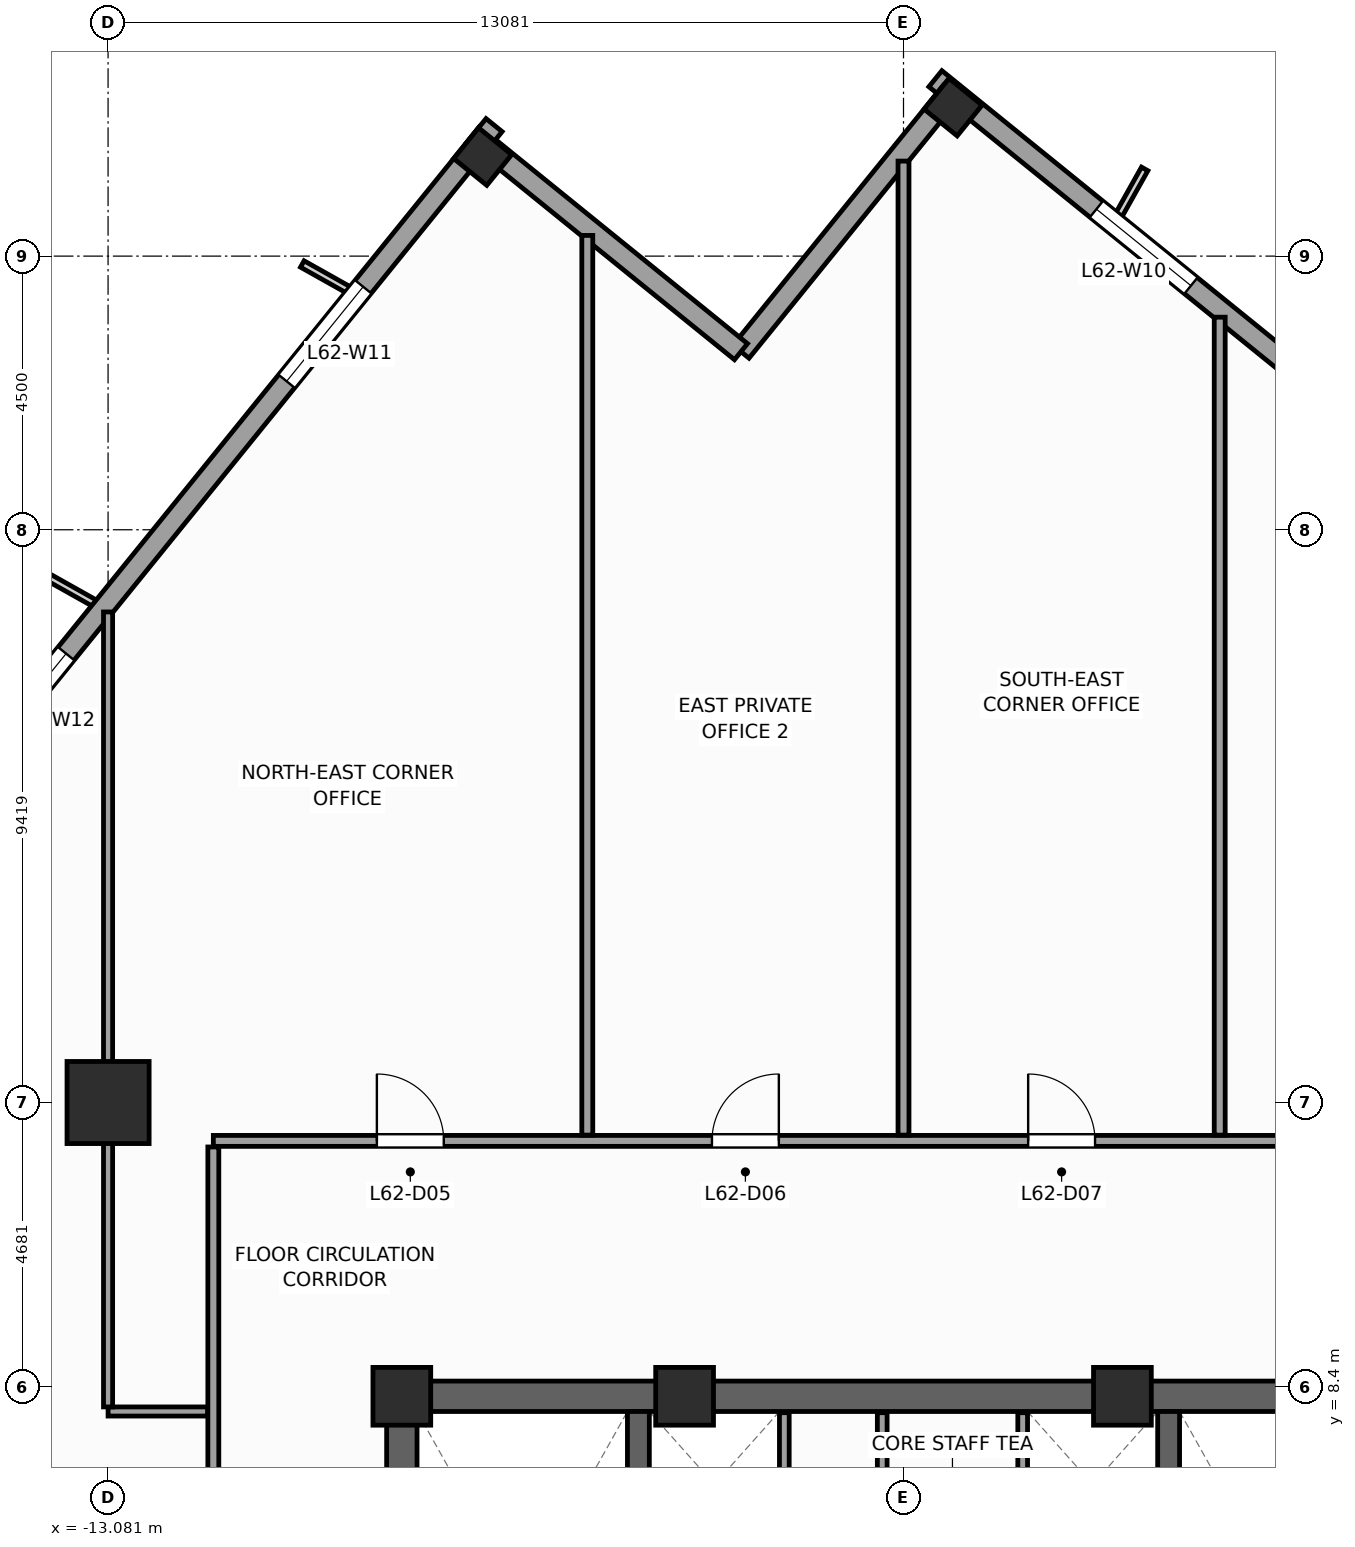
"""IFC4 building model, lengths in metres.
Left out: names, types, materials, properties, quantities, classifications, styles, units other than length and angle.
Written with IfcOpenShell. Run it as: python <this file> out.ifc"""

import sys

from ifc_helpers import new_model, si_unit, direction, frame, frame_2d, origin, origin_2d, place, context, subcontext, project, spatial, rectangle, extrude, source, transform, mapped, element, fill, save


model = new_model("IFC4")
c1 = context("Model", 3, precision=1e-05, world=origin(), true_north=direction((0.0, 1.0)))
c2 = subcontext(c1, "Body", "Model", "MODEL_VIEW")
j1 = project(units=[si_unit("LENGTHUNIT", "METRE"), si_unit("PLANEANGLEUNIT", "RADIAN")], contexts=[c1])
p1 = place(None, origin())
s1 = spatial("IfcSite", under=j1, at=p1, CompositionType="ELEMENT")
p2 = place(p1, origin())
s2 = spatial("IfcBuilding", under=s1, at=p2, CompositionType="ELEMENT")
p3 = place(p2, frame((0.0, 0.0, 256.3)))
s3 = spatial("IfcBuildingStorey", under=s2, at=p3, CompositionType="ELEMENT", Elevation=256.3)
p4 = place(p3, frame((-8.5, 8.25, 0.0), z_axis=(0.0, 0.0, 1.0), x_axis=(1.0, 0.0, 0.0)))
e1 = element("IfcWall", 1, at=p4, inside=s3, PredefinedType="SHEAR", context=c2, shape_type="SweptSolid", body=[
    extrude(rectangle(XDim=17.0, YDim=0.5, at=frame_2d((8.5, 0.0))), origin(), (0.0, 0.0, 1.0), 3.9),
])
p5 = place(p3, frame((-8.25, -8.0, 0.0), z_axis=(0.0, 0.0, 1.0), x_axis=(0.0, 1.0, 0.0)))
e2 = element("IfcWall", 2, at=p5, inside=s3, PredefinedType="SHEAR", context=c2, shape_type="SweptSolid", body=[
    extrude(rectangle(XDim=16.0, YDim=0.5, at=frame_2d((8.0, 0.0))), origin(), (0.0, 0.0, 1.0), 3.9),
])
p6 = place(p5, frame((4.69, 0.0, 0.0)))
e3 = element("IfcOpeningElement", 3, at=p6, cuts=e2, PredefinedType="OPENING", context=c2, shape_type="SweptSolid", body=[
    extrude(rectangle(XDim=1.3, YDim=2.2, at=frame_2d((0.65, 1.1))), frame((0.0, 0.26, 0.0), z_axis=(0.0, -1.0, 0.0), x_axis=(1.0, 0.0, 0.0)), (0.0, 0.0, 1.0), 0.52),
])
for number, where, z_axis, x_axis in (
    (4, (-4.36, -8.0, 0.0), (0.0, 0.0, 1.0), (0.0, 1.0, 0.0)),
    (5, (4.36, -8.0, 0.0), (0.0, 0.0, 1.0), (0.0, 1.0, 0.0)),
):
    element("IfcWall", number, at=place(p3, frame(where, z_axis=z_axis, x_axis=x_axis)), inside=s3, PredefinedType="SHEAR", context=c2, shape_type="SweptSolid", body=[
        extrude(rectangle(XDim=16.0, YDim=0.36, at=frame_2d((8.0, 0.0))), origin(), (0.0, 0.0, 1.0), 3.9),
    ])
m1 = source(origin(), c2, "Body", "SweptSolid", [
    extrude(rectangle(XDim=0.95, YDim=0.95, at=origin_2d()), origin(), (0.0, 0.0, 1.0), 3.9),
])
for number, where, z_axis, x_axis in (
    (6, (-8.25, 8.25, 0.0), (0.0, 0.0, 1.0), (1.0, 0.0, 0.0)),
    (7, (-3.6, 8.25, 0.0), (0.0, 0.0, 1.0), (1.0, 0.0, 0.0)),
    (8, (3.6, 8.25, 0.0), (0.0, 0.0, 1.0), (1.0, 0.0, 0.0)),
):
    element("IfcColumn", number, at=place(p3, frame(where, z_axis=z_axis, x_axis=x_axis)), inside=s3, PredefinedType="PILASTER", context=c2, shape_type="MappedRepresentation", body=[
        mapped(m1, transform((0.0, 0.0, 0.0), scale=1.0)),
    ])
m2 = source(origin(), c2, "Body", "SweptSolid", [
    extrude(rectangle(XDim=1.35, YDim=1.35, at=origin_2d()), origin(), (0.0, 0.0, 1.0), 3.9),
])
p7 = place(p3, frame((-13.081, 13.081, 0.0), z_axis=(0.0, 0.0, 1.0), x_axis=(1.0, 0.0, 0.0)))
e9 = element("IfcColumn", 9, at=p7, inside=s3, PredefinedType="COLUMN", context=c2, shape_type="MappedRepresentation", body=[
    mapped(m2, transform((0.0, 0.0, 0.0), scale=1.0)),
])
m3 = source(origin(), c2, "Body", "SweptSolid", [
    extrude(rectangle(XDim=0.65, YDim=0.7, at=origin_2d()), origin(), (0.0, 0.0, 1.0), 3.9),
])
for number, where, z_axis, x_axis in (
    (10, (0.815, 29.45, 0.0), (0.0, 0.0, 1.0), (0.629, 0.777, 0.0)),
    (11, (-6.92, 28.637, 0.0), (0.0, 0.0, 1.0), (0.629, 0.777, 0.0)),
):
    element("IfcColumn", number, at=place(p3, frame(where, z_axis=z_axis, x_axis=x_axis)), inside=s3, PredefinedType="COLUMN", context=c2, shape_type="MappedRepresentation", body=[
        mapped(m3, transform((0.0, 0.0, 0.0), scale=1.0)),
    ])
p8 = place(p3, frame((29.154, 6.733, 0.0), z_axis=(0.0, 0.0, 1.0), x_axis=(-0.77714192302, 0.629325378072, 0.0)))
e12 = element("IfcWall", 12, at=p8, inside=s3, PredefinedType="STANDARD", context=c2, shape_type="SweptSolid", body=[
    extrude(rectangle(XDim=36.84, YDim=0.34, at=frame_2d((18.42, 0.0))), origin(), (0.0, 0.0, 1.0), 2.02),
])
p9 = place(p8, frame((3.421, 0.0, 0.49)))
e13 = element("IfcOpeningElement", 13, at=p9, cuts=e12, PredefinedType="OPENING", context=c2, shape_type="SweptSolid", body=[
    extrude(rectangle(XDim=2.0, YDim=1.45, at=frame_2d((1.0, 0.725))), frame((0.0, 0.18, 0.0), z_axis=(0.0, -1.0, 0.0), x_axis=(1.0, 0.0, 0.0)), (0.0, 0.0, 1.0), 0.36),
])
p10 = place(p8, frame((9.684, 0.0, 0.49)))
e14 = element("IfcOpeningElement", 14, at=p10, cuts=e12, PredefinedType="OPENING", context=c2, shape_type="SweptSolid", body=[
    extrude(rectangle(XDim=2.0, YDim=1.45, at=frame_2d((1.0, 0.725))), frame((0.0, 0.18, 0.0), z_axis=(0.0, -1.0, 0.0), x_axis=(1.0, 0.0, 0.0)), (0.0, 0.0, 1.0), 0.36),
])
p11 = place(p8, frame((15.183, 0.0, 0.49)))
e15 = element("IfcOpeningElement", 15, at=p11, cuts=e12, PredefinedType="OPENING", context=c2, shape_type="SweptSolid", body=[
    extrude(rectangle(XDim=2.0, YDim=1.45, at=frame_2d((1.0, 0.725))), frame((0.0, 0.18, 0.0), z_axis=(0.0, -1.0, 0.0), x_axis=(1.0, 0.0, 0.0)), (0.0, 0.0, 1.0), 0.36),
])
p12 = place(p8, frame((24.051, 0.0, 0.49)))
e16 = element("IfcOpeningElement", 16, at=p12, cuts=e12, PredefinedType="OPENING", context=c2, shape_type="SweptSolid", body=[
    extrude(rectangle(XDim=2.0, YDim=1.45, at=frame_2d((1.0, 0.725))), frame((0.0, 0.18, 0.0), z_axis=(0.0, -1.0, 0.0), x_axis=(1.0, 0.0, 0.0)), (0.0, 0.0, 1.0), 0.36),
])
p13 = place(p8, frame((31.432, 0.0, 0.49)))
e17 = element("IfcOpeningElement", 17, at=p13, cuts=e12, PredefinedType="OPENING", context=c2, shape_type="SweptSolid", body=[
    extrude(rectangle(XDim=2.0, YDim=1.45, at=frame_2d((1.0, 0.725))), frame((0.0, 0.18, 0.0), z_axis=(0.0, -1.0, 0.0), x_axis=(1.0, 0.0, 0.0)), (0.0, 0.0, 1.0), 0.36),
])
p14 = place(p3, frame((0.789, 29.703, 0.0), z_axis=(0.0, 0.0, 1.0), x_axis=(-0.629323365087, -0.77714355312, 0.0)))
e18 = element("IfcWall", 18, at=p14, inside=s3, PredefinedType="STANDARD", context=c2, shape_type="SweptSolid", body=[
    extrude(rectangle(XDim=5.5, YDim=0.34, at=frame_2d((2.75, 0.0))), origin(), (0.0, 0.0, 1.0), 3.5),
])
p15 = place(p3, frame((-2.673, 25.429, 0.0), z_axis=(0.0, 0.0, 1.0), x_axis=(-0.777162640055, 0.629299794138, 0.0)))
e19 = element("IfcWall", 19, at=p15, inside=s3, PredefinedType="STANDARD", context=c2, shape_type="SweptSolid", body=[
    extrude(rectangle(XDim=5.67, YDim=0.34, at=frame_2d((2.835, 0.0))), origin(), (0.0, 0.0, 1.0), 2.02),
])
p16 = place(p3, frame((-6.733, 29.154, 0.0), z_axis=(0.0, 0.0, 1.0), x_axis=(-0.629325378072, -0.77714192302, 0.0)))
e20 = element("IfcWall", 20, at=p16, inside=s3, PredefinedType="STANDARD", context=c2, shape_type="SweptSolid", body=[
    extrude(rectangle(XDim=36.84, YDim=0.34, at=frame_2d((18.42, 0.0))), origin(), (0.0, 0.0, 1.0), 2.02),
])
p17 = place(p16, frame((23.495, 0.0, 0.0)))
e21 = element("IfcOpeningElement", 21, at=p17, cuts=e20, PredefinedType="OPENING", context=c2, shape_type="SweptSolid", body=[
    extrude(rectangle(XDim=1.05, YDim=2.02, at=frame_2d((0.525, 1.01))), frame((0.0, 0.18, 0.0), z_axis=(0.0, -1.0, 0.0), x_axis=(1.0, 0.0, 0.0)), (0.0, 0.0, 1.0), 0.36),
])
p18 = place(p16, frame((3.421, 0.0, 0.49)))
e22 = element("IfcOpeningElement", 22, at=p18, cuts=e20, PredefinedType="OPENING", context=c2, shape_type="SweptSolid", body=[
    extrude(rectangle(XDim=2.0, YDim=1.45, at=frame_2d((1.0, 0.725))), frame((0.0, 0.18, 0.0), z_axis=(0.0, -1.0, 0.0), x_axis=(1.0, 0.0, 0.0)), (0.0, 0.0, 1.0), 0.36),
])
p19 = place(p16, frame((11.184, 0.0, 0.49)))
e23 = element("IfcOpeningElement", 23, at=p19, cuts=e20, PredefinedType="OPENING", context=c2, shape_type="SweptSolid", body=[
    extrude(rectangle(XDim=2.0, YDim=1.45, at=frame_2d((1.0, 0.725))), frame((0.0, 0.18, 0.0), z_axis=(0.0, -1.0, 0.0), x_axis=(1.0, 0.0, 0.0)), (0.0, 0.0, 1.0), 0.36),
])
p20 = place(p16, frame((15.183, 0.0, 0.49)))
e24 = element("IfcOpeningElement", 24, at=p20, cuts=e20, PredefinedType="OPENING", context=c2, shape_type="SweptSolid", body=[
    extrude(rectangle(XDim=2.0, YDim=1.45, at=frame_2d((1.0, 0.725))), frame((0.0, 0.18, 0.0), z_axis=(0.0, -1.0, 0.0), x_axis=(1.0, 0.0, 0.0)), (0.0, 0.0, 1.0), 0.36),
])
p21 = place(p16, frame((26.301, 0.0, 0.49)))
e25 = element("IfcOpeningElement", 25, at=p21, cuts=e20, PredefinedType="OPENING", context=c2, shape_type="SweptSolid", body=[
    extrude(rectangle(XDim=2.0, YDim=1.45, at=frame_2d((1.0, 0.725))), frame((0.0, 0.18, 0.0), z_axis=(0.0, -1.0, 0.0), x_axis=(1.0, 0.0, 0.0)), (0.0, 0.0, 1.0), 0.36),
])
p22 = place(p16, frame((29.182, 0.0, 0.49)))
e26 = element("IfcOpeningElement", 26, at=p22, cuts=e20, PredefinedType="OPENING", context=c2, shape_type="SweptSolid", body=[
    extrude(rectangle(XDim=2.0, YDim=1.45, at=frame_2d((1.0, 0.725))), frame((0.0, 0.18, 0.0), z_axis=(0.0, -1.0, 0.0), x_axis=(1.0, 0.0, 0.0)), (0.0, 0.0, 1.0), 0.36),
])
for number, where, z_axis, x_axis in (
    (27, (-1.96, 4.58, 0.0), (0.0, 0.0, 1.0), (0.0, 1.0, 0.0)),
    (28, (1.96, 4.58, 0.0), (0.0, 0.0, 1.0), (0.0, 1.0, 0.0)),
):
    element("IfcWall", number, at=place(p3, frame(where, z_axis=z_axis, x_axis=x_axis)), inside=s3, PredefinedType="PARTITIONING", context=c2, shape_type="SweptSolid", body=[
        extrude(rectangle(XDim=3.4, YDim=0.16, at=frame_2d((1.7, 0.0))), origin(), (0.0, 0.0, 1.0), 3.5),
    ])
p23 = place(p3, frame((-0.35, 4.6, 0.0), z_axis=(0.0, 0.0, 1.0), x_axis=(0.0, 1.0, 0.0)))
e29 = element("IfcWall", 29, at=p23, inside=s3, PredefinedType="PARTITIONING", context=c2, shape_type="SweptSolid", body=[
    extrude(rectangle(XDim=3.38, YDim=0.16, at=frame_2d((1.69, 0.0))), origin(), (0.0, 0.0, 1.0), 3.5),
])
p24 = place(p3, frame((-11.35, 12.45, 0.0), z_axis=(0.0, 0.0, 1.0), x_axis=(1.0, 0.0, 0.0)))
e30 = element("IfcWall", 30, at=p24, inside=s3, PredefinedType="PARTITIONING", context=c2, shape_type="SweptSolid", body=[
    extrude(rectangle(XDim=21.65, YDim=0.18, at=frame_2d((10.825, 0.0))), origin(), (0.0, 0.0, 1.0), 2.46),
])
p25 = place(p24, frame((2.689, 0.0, 0.0)))
e31 = element("IfcOpeningElement", 31, at=p25, cuts=e30, PredefinedType="OPENING", context=c2, shape_type="SweptSolid", body=[
    extrude(rectangle(XDim=1.1, YDim=2.2, at=frame_2d((0.55, 1.1))), frame((0.0, 0.1, 0.0), z_axis=(0.0, -1.0, 0.0), x_axis=(1.0, 0.0, 0.0)), (0.0, 0.0, 1.0), 0.2),
])
p26 = place(p24, frame((8.2, 0.0, 0.0)))
e32 = element("IfcOpeningElement", 32, at=p26, cuts=e30, PredefinedType="OPENING", context=c2, shape_type="SweptSolid", body=[
    extrude(rectangle(XDim=1.1, YDim=2.2, at=frame_2d((0.55, 1.1))), frame((0.0, 0.1, 0.0), z_axis=(0.0, -1.0, 0.0), x_axis=(1.0, 0.0, 0.0)), (0.0, 0.0, 1.0), 0.2),
])
p27 = place(p24, frame((13.4, 0.0, 0.0)))
e33 = element("IfcOpeningElement", 33, at=p27, cuts=e30, PredefinedType="OPENING", context=c2, shape_type="SweptSolid", body=[
    extrude(rectangle(XDim=1.1, YDim=2.2, at=frame_2d((0.55, 1.1))), frame((0.0, 0.1, 0.0), z_axis=(0.0, -1.0, 0.0), x_axis=(1.0, 0.0, 0.0)), (0.0, 0.0, 1.0), 0.2),
])
p28 = place(p24, frame((18.385, 0.0, 0.0)))
e34 = element("IfcOpeningElement", 34, at=p28, cuts=e30, PredefinedType="OPENING", context=c2, shape_type="SweptSolid", body=[
    extrude(rectangle(XDim=1.1, YDim=2.2, at=frame_2d((0.55, 1.1))), frame((0.0, 0.1, 0.0), z_axis=(0.0, -1.0, 0.0), x_axis=(1.0, 0.0, 0.0)), (0.0, 0.0, 1.0), 0.2),
])
p29 = place(p3, frame((-11.35, -11.3, 0.0), z_axis=(0.0, 0.0, 1.0), x_axis=(0.0, 1.0, 0.0)))
e35 = element("IfcWall", 35, at=p29, inside=s3, PredefinedType="PARTITIONING", context=c2, shape_type="SweptSolid", body=[
    extrude(rectangle(XDim=23.65, YDim=0.18, at=frame_2d((11.825, 0.0))), origin(), (0.0, 0.0, 1.0), 3.5),
])
p30 = place(p29, frame((13.1, 0.0, 0.0)))
e36 = element("IfcOpeningElement", 36, at=p30, cuts=e35, PredefinedType="OPENING", context=c2, shape_type="SweptSolid", body=[
    extrude(rectangle(XDim=1.1, YDim=2.2, at=frame_2d((0.55, 1.1))), frame((0.0, 0.1, 0.0), z_axis=(0.0, -1.0, 0.0), x_axis=(1.0, 0.0, 0.0)), (0.0, 0.0, 1.0), 0.2),
])
p31 = place(p29, frame((16.85, 0.0, 0.0)))
e37 = element("IfcOpeningElement", 37, at=p31, cuts=e35, PredefinedType="OPENING", context=c2, shape_type="SweptSolid", body=[
    extrude(rectangle(XDim=1.1, YDim=2.2, at=frame_2d((0.55, 1.1))), frame((0.0, 0.1, 0.0), z_axis=(0.0, -1.0, 0.0), x_axis=(1.0, 0.0, 0.0)), (0.0, 0.0, 1.0), 0.2),
])
p32 = place(p29, frame((5.0, 0.0, 0.0)))
e38 = element("IfcOpeningElement", 38, at=p32, cuts=e35, PredefinedType="OPENING", context=c2, shape_type="SweptSolid", body=[
    extrude(rectangle(XDim=1.1, YDim=2.2, at=frame_2d((0.55, 1.1))), frame((0.0, 0.1, 0.0), z_axis=(0.0, -1.0, 0.0), x_axis=(1.0, 0.0, 0.0)), (0.0, 0.0, 1.0), 0.2),
])
p33 = place(p29, frame((9.25, 0.0, 0.0)))
e39 = element("IfcOpeningElement", 39, at=p33, cuts=e35, PredefinedType="OPENING", context=c2, shape_type="SweptSolid", body=[
    extrude(rectangle(XDim=1.1, YDim=2.2, at=frame_2d((0.55, 1.1))), frame((0.0, 0.1, 0.0), z_axis=(0.0, -1.0, 0.0), x_axis=(1.0, 0.0, 0.0)), (0.0, 0.0, 1.0), 0.2),
])
p34 = place(p3, frame((-5.2, 12.545, 0.0), z_axis=(0.0, 0.0, 1.0), x_axis=(0.0, 1.0, 0.0)))
e40 = element("IfcWall", 40, at=p34, inside=s3, PredefinedType="PARTITIONING", context=c2, shape_type="SweptSolid", body=[
    extrude(rectangle(XDim=14.795, YDim=0.18, at=frame_2d((7.398, 0.0))), origin(), (0.0, 0.0, 1.0), 3.5),
])
p35 = place(p3, frame((0.0, 12.545, 0.0), z_axis=(0.0, 0.0, 1.0), x_axis=(0.0, 1.0, 0.0)))
e41 = element("IfcWall", 41, at=p35, inside=s3, PredefinedType="PARTITIONING", context=c2, shape_type="SweptSolid", body=[
    extrude(rectangle(XDim=16.018, YDim=0.18, at=frame_2d((8.009, 0.0))), origin(), (0.0, 0.0, 1.0), 3.5),
])
p36 = place(p3, frame((5.2, 12.545, 0.0), z_axis=(0.0, 0.0, 1.0), x_axis=(0.0, 1.0, 0.0)))
e42 = element("IfcWall", 42, at=p36, inside=s3, PredefinedType="PARTITIONING", context=c2, shape_type="SweptSolid", body=[
    extrude(rectangle(XDim=13.451, YDim=0.18, at=frame_2d((6.726, 0.0))), origin(), (0.0, 0.0, 1.0), 3.5),
])
p37 = place(p3, frame((-11.445, 8.0, 0.0), z_axis=(0.0, 0.0, 1.0), x_axis=(-1.0, 0.0, 0.0)))
e43 = element("IfcWall", 43, at=p37, inside=s3, PredefinedType="PARTITIONING", context=c2, shape_type="SweptSolid", body=[
    extrude(rectangle(XDim=1.636, YDim=0.15, at=frame_2d((0.818, 0.0))), origin(), (0.0, 0.0, 1.0), 3.5),
])
p38 = place(p3, frame((-13.081, 8.075, 0.0), z_axis=(0.0, 0.0, 1.0), x_axis=(0.0, 1.0, 0.0)))
e44 = element("IfcWall", 44, at=p38, inside=s3, PredefinedType="PARTITIONING", context=c2, shape_type="SweptSolid", body=[
    extrude(rectangle(XDim=13.073, YDim=0.15, at=frame_2d((6.537, 0.0))), origin(), (0.0, 0.0, 1.0), 2.02),
])
m4 = source(origin(), c2, "Body", "SweptSolid", [
    extrude(rectangle(XDim=2.0, YDim=1.45, at=frame_2d((1.0, 0.725))), frame((0.0, 0.03, 0.0), z_axis=(0.0, -1.0, 0.0), x_axis=(1.0, 0.0, 0.0)), (0.0, 0.0, 1.0), 0.06),
])
p39 = place(p13, origin())
e45 = element("IfcWindow", 45, at=p39, inside=s3, PartitioningType="SINGLE_PANEL", PredefinedType="WINDOW", context=c2, shape_type="MappedRepresentation", body=[
    mapped(m4, transform((0.0, 0.0, 0.0), scale=1.0)),
])
fill(e17, e45)
p40 = place(p18, origin())
e46 = element("IfcWindow", 46, at=p40, inside=s3, PartitioningType="SINGLE_PANEL", PredefinedType="WINDOW", context=c2, shape_type="MappedRepresentation", body=[
    mapped(m4, transform((0.0, 0.0, 0.0), scale=1.0)),
])
fill(e22, e46)
p41 = place(p19, origin())
e47 = element("IfcWindow", 47, at=p41, inside=s3, PartitioningType="SINGLE_PANEL", PredefinedType="WINDOW", context=c2, shape_type="MappedRepresentation", body=[
    mapped(m4, transform((0.0, 0.0, 0.0), scale=1.0)),
])
fill(e23, e47)
m5 = source(origin(), c2, "Body", "SweptSolid", [
    extrude(rectangle(XDim=1.1, YDim=2.2, at=frame_2d((0.55, 1.1))), frame((0.0, 0.025, 0.0), z_axis=(0.0, -1.0, 0.0), x_axis=(1.0, 0.0, 0.0)), (0.0, 0.0, 1.0), 0.05),
])
p42 = place(p25, origin())
e48 = element("IfcDoor", 48, at=p42, inside=s3, OperationType="SINGLE_SWING_LEFT", PredefinedType="DOOR", context=c2, shape_type="MappedRepresentation", body=[
    mapped(m5, transform((0.0, 0.0, 0.0), scale=1.0)),
])
fill(e31, e48)
p43 = place(p26, origin())
e49 = element("IfcDoor", 49, at=p43, inside=s3, OperationType="SINGLE_SWING_RIGHT", PredefinedType="DOOR", context=c2, shape_type="MappedRepresentation", body=[
    mapped(m5, transform((0.0, 0.0, 0.0), scale=1.0)),
])
fill(e32, e49)
p44 = place(p27, origin())
e50 = element("IfcDoor", 50, at=p44, inside=s3, OperationType="SINGLE_SWING_LEFT", PredefinedType="DOOR", context=c2, shape_type="MappedRepresentation", body=[
    mapped(m5, transform((0.0, 0.0, 0.0), scale=1.0)),
])
fill(e33, e50)
save(model, sys.argv[1])
